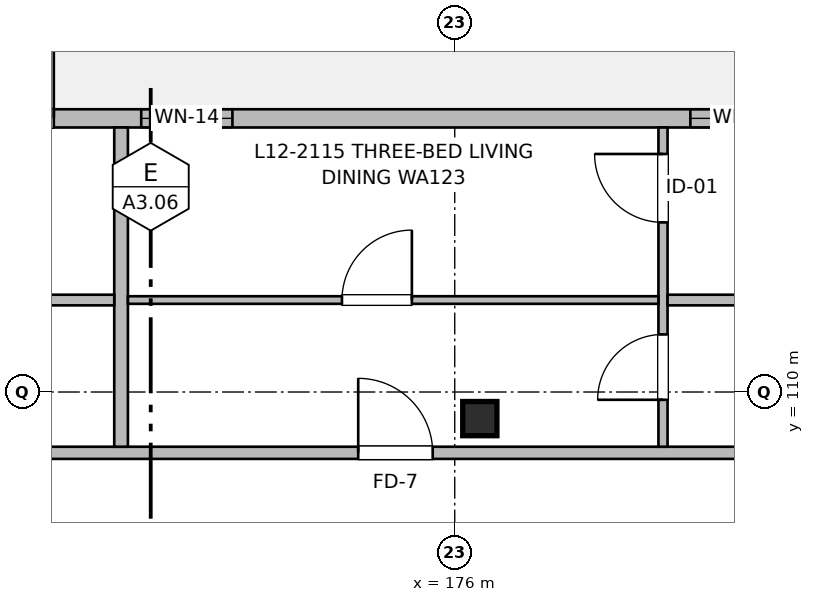
"""IFC4 building model, lengths in metres.
Left out: names, types, materials, properties, quantities, classifications, styles, units other than length and angle.
Written with IfcOpenShell. Run it as: python <this file> out.ifc"""

import sys

from ifc_helpers import new_model, si_unit, direction, frame, frame_2d, origin, origin_2d, place, context, subcontext, project, spatial, rectangle, extrude, element, fill, save


model = new_model("IFC4")
c1 = context("Model", 3, precision=1e-05, world=origin(), true_north=direction((0.0, 1.0)))
c2 = subcontext(c1, "Body", "Model", "MODEL_VIEW")
j1 = project(units=[si_unit("LENGTHUNIT", "METRE"), si_unit("PLANEANGLEUNIT", "RADIAN")], contexts=[c1])
p1 = place(None, origin())
s1 = spatial("IfcSite", under=j1, at=p1, CompositionType="ELEMENT")
p2 = place(p1, origin())
s2 = spatial("IfcBuilding", under=s1, at=p2, CompositionType="ELEMENT")
p3 = place(p2, frame((0.0, 0.0, 39.36)))
s3 = spatial("IfcBuildingStorey", under=s2, at=p3, CompositionType="ELEMENT", Elevation=39.36)
p4 = place(p3, frame((176.33, 109.65, 0.0), z_axis=(0.0, 0.0, 1.0), x_axis=(1.0, 0.0, 0.0)))
e1 = element("IfcColumn", 1, at=p4, inside=s3, PredefinedType="COLUMN", context=c2, shape_type="SweptSolid", body=[
    extrude(rectangle(XDim=0.45, YDim=0.45, at=origin_2d()), origin(), (0.0, 0.0, 1.0), 3.2),
])
p5 = place(p3, frame((147.0, 113.6, 0.0), z_axis=(0.0, 0.0, 1.0), x_axis=(1.0, 0.0, 0.0)))
e2 = element("IfcWall", 2, at=p5, inside=s3, PredefinedType="SOLIDWALL", context=c2, shape_type="SweptSolid", body=[
    extrude(rectangle(XDim=37.0, YDim=0.24, at=frame_2d((18.5, 0.0))), origin(), (0.0, 0.0, 1.0), 2.98),
])
p6 = place(p5, frame((4.025, 0.0, 0.0)))
e3 = element("IfcOpeningElement", 3, at=p6, cuts=e2, PredefinedType="OPENING", context=c2, shape_type="SweptSolid", body=[
    extrude(rectangle(XDim=1.2, YDim=2.2, at=frame_2d((0.6, 1.1))), frame((0.0, 0.13, 0.0), z_axis=(0.0, -1.0, 0.0), x_axis=(1.0, 0.0, 0.0)), (0.0, 0.0, 1.0), 0.26),
])
p7 = place(p5, frame((7.725, 0.0, 0.72)))
e4 = element("IfcOpeningElement", 4, at=p7, cuts=e2, PredefinedType="OPENING", context=c2, shape_type="SweptSolid", body=[
    extrude(rectangle(XDim=2.25, YDim=1.5, at=frame_2d((1.125, 0.75))), frame((0.0, 0.13, 0.0), z_axis=(0.0, -1.0, 0.0), x_axis=(1.0, 0.0, 0.0)), (0.0, 0.0, 1.0), 0.26),
])
p8 = place(p5, frame((13.025, 0.0, 0.72)))
e5 = element("IfcOpeningElement", 5, at=p8, cuts=e2, PredefinedType="OPENING", context=c2, shape_type="SweptSolid", body=[
    extrude(rectangle(XDim=1.7, YDim=1.5, at=frame_2d((0.85, 0.75))), frame((0.0, 0.13, 0.0), z_axis=(0.0, -1.0, 0.0), x_axis=(1.0, 0.0, 0.0)), (0.0, 0.0, 1.0), 0.26),
])
p9 = place(p5, frame((22.525, 0.0, 0.0)))
e6 = element("IfcOpeningElement", 6, at=p9, cuts=e2, PredefinedType="OPENING", context=c2, shape_type="SweptSolid", body=[
    extrude(rectangle(XDim=1.2, YDim=2.2, at=frame_2d((0.6, 1.1))), frame((0.0, 0.13, 0.0), z_axis=(0.0, -1.0, 0.0), x_axis=(1.0, 0.0, 0.0)), (0.0, 0.0, 1.0), 0.26),
])
p10 = place(p5, frame((24.875, 0.0, 0.9)))
e7 = element("IfcOpeningElement", 7, at=p10, cuts=e2, PredefinedType="OPENING", context=c2, shape_type="SweptSolid", body=[
    extrude(rectangle(XDim=1.2, YDim=1.05, at=frame_2d((0.6, 0.525))), frame((0.0, 0.13, 0.0), z_axis=(0.0, -1.0, 0.0), x_axis=(1.0, 0.0, 0.0)), (0.0, 0.0, 1.0), 0.26),
])
p11 = place(p5, frame((32.1, 0.0, 0.77)))
e8 = element("IfcOpeningElement", 8, at=p11, cuts=e2, PredefinedType="OPENING", context=c2, shape_type="SweptSolid", body=[
    extrude(rectangle(XDim=1.45, YDim=1.45, at=frame_2d((0.725, 0.725))), frame((0.0, 0.13, 0.0), z_axis=(0.0, -1.0, 0.0), x_axis=(1.0, 0.0, 0.0)), (0.0, 0.0, 1.0), 0.26),
])
p12 = place(p3, frame((147.16, 109.2, 0.0), z_axis=(0.0, 0.0, 1.0), x_axis=(1.0, 0.0, 0.0)))
e9 = element("IfcWall", 9, at=p12, inside=s3, PredefinedType="PARTITIONING", context=c2, shape_type="SweptSolid", body=[
    extrude(rectangle(XDim=36.68, YDim=0.16, at=frame_2d((18.34, 0.0))), origin(), (0.0, 0.0, 1.0), 2.935),
])
p13 = place(p12, frame((3.03, 0.0, 0.0)))
e10 = element("IfcOpeningElement", 10, at=p13, cuts=e9, PredefinedType="OPENING", context=c2, shape_type="SweptSolid", body=[
    extrude(rectangle(XDim=0.98, YDim=2.15, at=frame_2d((0.49, 1.075))), frame((0.0, 0.09, 0.0), z_axis=(0.0, -1.0, 0.0), x_axis=(1.0, 0.0, 0.0)), (0.0, 0.0, 1.0), 0.18),
])
p14 = place(p12, frame((15.32, 0.0, 0.0)))
e11 = element("IfcOpeningElement", 11, at=p14, cuts=e9, PredefinedType="OPENING", context=c2, shape_type="SweptSolid", body=[
    extrude(rectangle(XDim=0.98, YDim=2.15, at=frame_2d((0.49, 1.075))), frame((0.0, 0.09, 0.0), z_axis=(0.0, -1.0, 0.0), x_axis=(1.0, 0.0, 0.0)), (0.0, 0.0, 1.0), 0.18),
])
p15 = place(p12, frame((27.57, 0.0, 0.0)))
e12 = element("IfcOpeningElement", 12, at=p15, cuts=e9, PredefinedType="OPENING", context=c2, shape_type="SweptSolid", body=[
    extrude(rectangle(XDim=0.98, YDim=2.15, at=frame_2d((0.49, 1.075))), frame((0.0, 0.09, 0.0), z_axis=(0.0, -1.0, 0.0), x_axis=(1.0, 0.0, 0.0)), (0.0, 0.0, 1.0), 0.18),
])
p16 = place(p3, frame((171.61, 109.28, 0.0), z_axis=(0.0, 0.0, 1.0), x_axis=(0.0, 1.0, 0.0)))
e13 = element("IfcWall", 13, at=p16, inside=s3, PredefinedType="PARTITIONING", context=c2, shape_type="SweptSolid", body=[
    extrude(rectangle(XDim=4.2, YDim=0.18, at=frame_2d((2.1, 0.0))), origin(), (0.0, 0.0, 1.0), 2.935),
])
p17 = place(p3, frame((166.52, 111.21, 0.0), z_axis=(0.0, 0.0, 1.0), x_axis=(1.0, 0.0, 0.0)))
e14 = element("IfcWall", 14, at=p17, inside=s3, PredefinedType="PARTITIONING", context=c2, shape_type="SweptSolid", body=[
    extrude(rectangle(XDim=5.0, YDim=0.14, at=frame_2d((2.5, 0.0))), origin(), (0.0, 0.0, 1.0), 2.935),
])
p18 = place(p17, frame((3.224, 0.0, 0.0)))
e15 = element("IfcOpeningElement", 15, at=p18, cuts=e14, PredefinedType="OPENING", context=c2, shape_type="SweptSolid", body=[
    extrude(rectangle(XDim=0.85, YDim=2.05, at=frame_2d((0.425, 1.025))), frame((0.0, 0.08, 0.0), z_axis=(0.0, -1.0, 0.0), x_axis=(1.0, 0.0, 0.0)), (0.0, 0.0, 1.0), 0.16),
])
p19 = place(p3, frame((178.74, 109.28, 0.0), z_axis=(0.0, 0.0, 1.0), x_axis=(0.0, 1.0, 0.0)))
e16 = element("IfcWall", 16, at=p19, inside=s3, PredefinedType="PARTITIONING", context=c2, shape_type="SweptSolid", body=[
    extrude(rectangle(XDim=4.2, YDim=0.12, at=frame_2d((2.1, 0.0))), origin(), (0.0, 0.0, 1.0), 2.935),
])
p20 = place(p19, frame((0.618, 0.0, 0.0)))
e17 = element("IfcOpeningElement", 17, at=p20, cuts=e16, PredefinedType="OPENING", context=c2, shape_type="SweptSolid", body=[
    extrude(rectangle(XDim=0.86, YDim=2.1, at=frame_2d((0.43, 1.05))), frame((0.0, 0.07, 0.0), z_axis=(0.0, -1.0, 0.0), x_axis=(1.0, 0.0, 0.0)), (0.0, 0.0, 1.0), 0.14),
])
p21 = place(p19, frame((2.951, 0.0, 0.0)))
e18 = element("IfcOpeningElement", 18, at=p21, cuts=e16, PredefinedType="OPENING", context=c2, shape_type="SweptSolid", body=[
    extrude(rectangle(XDim=0.9, YDim=2.1, at=frame_2d((0.45, 1.05))), frame((0.0, 0.07, 0.0), z_axis=(0.0, -1.0, 0.0), x_axis=(1.0, 0.0, 0.0)), (0.0, 0.0, 1.0), 0.14),
])
p22 = place(p3, frame((178.8, 111.21, 0.0), z_axis=(0.0, 0.0, 1.0), x_axis=(1.0, 0.0, 0.0)))
e19 = element("IfcWall", 19, at=p22, inside=s3, PredefinedType="PARTITIONING", context=c2, shape_type="SweptSolid", body=[
    extrude(rectangle(XDim=5.04, YDim=0.14, at=frame_2d((2.52, 0.0))), origin(), (0.0, 0.0, 1.0), 2.935),
])
p23 = place(p22, frame((2.04, 0.0, 0.0)))
e20 = element("IfcOpeningElement", 20, at=p23, cuts=e19, PredefinedType="OPENING", context=c2, shape_type="SweptSolid", body=[
    extrude(rectangle(XDim=0.85, YDim=2.05, at=frame_2d((0.425, 1.025))), frame((0.0, 0.08, 0.0), z_axis=(0.0, -1.0, 0.0), x_axis=(1.0, 0.0, 0.0)), (0.0, 0.0, 1.0), 0.16),
])
p24 = place(p3, frame((171.7, 111.21, 0.0), z_axis=(0.0, 0.0, 1.0), x_axis=(1.0, 0.0, 0.0)))
e21 = element("IfcWall", 21, at=p24, inside=s3, PredefinedType="PARTITIONING", context=c2, shape_type="SweptSolid", body=[
    extrude(rectangle(XDim=6.98, YDim=0.1, at=frame_2d((3.49, 0.0))), origin(), (0.0, 0.0, 1.0), 2.935),
])
p25 = place(p24, frame((2.816, 0.0, 0.0)))
e22 = element("IfcOpeningElement", 22, at=p25, cuts=e21, PredefinedType="OPENING", context=c2, shape_type="SweptSolid", body=[
    extrude(rectangle(XDim=0.92, YDim=2.1, at=frame_2d((0.46, 1.05))), frame((0.0, 0.06, 0.0), z_axis=(0.0, -1.0, 0.0), x_axis=(1.0, 0.0, 0.0)), (0.0, 0.0, 1.0), 0.12),
])
p26 = place(p9, origin())
e23 = element("IfcDoor", 23, at=p26, inside=s3, OperationType="SINGLE_SWING_RIGHT", PredefinedType="DOOR", context=c2, shape_type="SweptSolid", body=[
    extrude(rectangle(XDim=1.2, YDim=2.2, at=frame_2d((0.6, 1.1))), frame((0.0, 0.025, 0.0), z_axis=(0.0, -1.0, 0.0), x_axis=(1.0, 0.0, 0.0)), (0.0, 0.0, 1.0), 0.05),
])
fill(e6, e23)
p27 = place(p10, origin())
e24 = element("IfcWindow", 24, at=p27, inside=s3, PartitioningType="SINGLE_PANEL", PredefinedType="WINDOW", context=c2, shape_type="SweptSolid", body=[
    extrude(rectangle(XDim=1.2, YDim=1.05, at=frame_2d((0.6, 0.525))), frame((0.0, 0.03, 0.0), z_axis=(0.0, -1.0, 0.0), x_axis=(1.0, 0.0, 0.0)), (0.0, 0.0, 1.0), 0.06),
])
fill(e7, e24)
p28 = place(p11, origin())
e25 = element("IfcWindow", 25, at=p28, inside=s3, PartitioningType="SINGLE_PANEL", PredefinedType="WINDOW", context=c2, shape_type="SweptSolid", body=[
    extrude(rectangle(XDim=1.45, YDim=1.45, at=frame_2d((0.725, 0.725))), frame((0.0, 0.03, 0.0), z_axis=(0.0, -1.0, 0.0), x_axis=(1.0, 0.0, 0.0)), (0.0, 0.0, 1.0), 0.06),
])
fill(e8, e25)
p29 = place(p15, origin())
e26 = element("IfcDoor", 26, at=p29, inside=s3, OperationType="SINGLE_SWING_LEFT", PredefinedType="DOOR", context=c2, shape_type="SweptSolid", body=[
    extrude(rectangle(XDim=0.98, YDim=2.15, at=frame_2d((0.49, 1.075))), frame((0.0, 0.025, 0.0), z_axis=(0.0, -1.0, 0.0), x_axis=(1.0, 0.0, 0.0)), (0.0, 0.0, 1.0), 0.05),
])
fill(e12, e26)
p30 = place(p25, origin())
e27 = element("IfcDoor", 27, at=p30, inside=s3, OperationType="SINGLE_SWING_RIGHT", PredefinedType="DOOR", context=c2, shape_type="SweptSolid", body=[
    extrude(rectangle(XDim=0.92, YDim=2.1, at=frame_2d((0.46, 1.05))), frame((0.0, 0.025, 0.0), z_axis=(0.0, -1.0, 0.0), x_axis=(1.0, 0.0, 0.0)), (0.0, 0.0, 1.0), 0.05),
])
fill(e22, e27)
p31 = place(p20, origin())
e28 = element("IfcDoor", 28, at=p31, inside=s3, OperationType="SINGLE_SWING_LEFT", PredefinedType="DOOR", context=c2, shape_type="SweptSolid", body=[
    extrude(rectangle(XDim=0.86, YDim=2.1, at=frame_2d((0.43, 1.05))), frame((0.0, 0.025, 0.0), z_axis=(0.0, -1.0, 0.0), x_axis=(1.0, 0.0, 0.0)), (0.0, 0.0, 1.0), 0.05),
])
fill(e17, e28)
p32 = place(p21, origin())
e29 = element("IfcDoor", 29, at=p32, inside=s3, OperationType="SINGLE_SWING_RIGHT", PredefinedType="DOOR", context=c2, shape_type="SweptSolid", body=[
    extrude(rectangle(XDim=0.9, YDim=2.1, at=frame_2d((0.45, 1.05))), frame((0.0, 0.025, 0.0), z_axis=(0.0, -1.0, 0.0), x_axis=(1.0, 0.0, 0.0)), (0.0, 0.0, 1.0), 0.05),
])
fill(e18, e29)
save(model, sys.argv[1])
